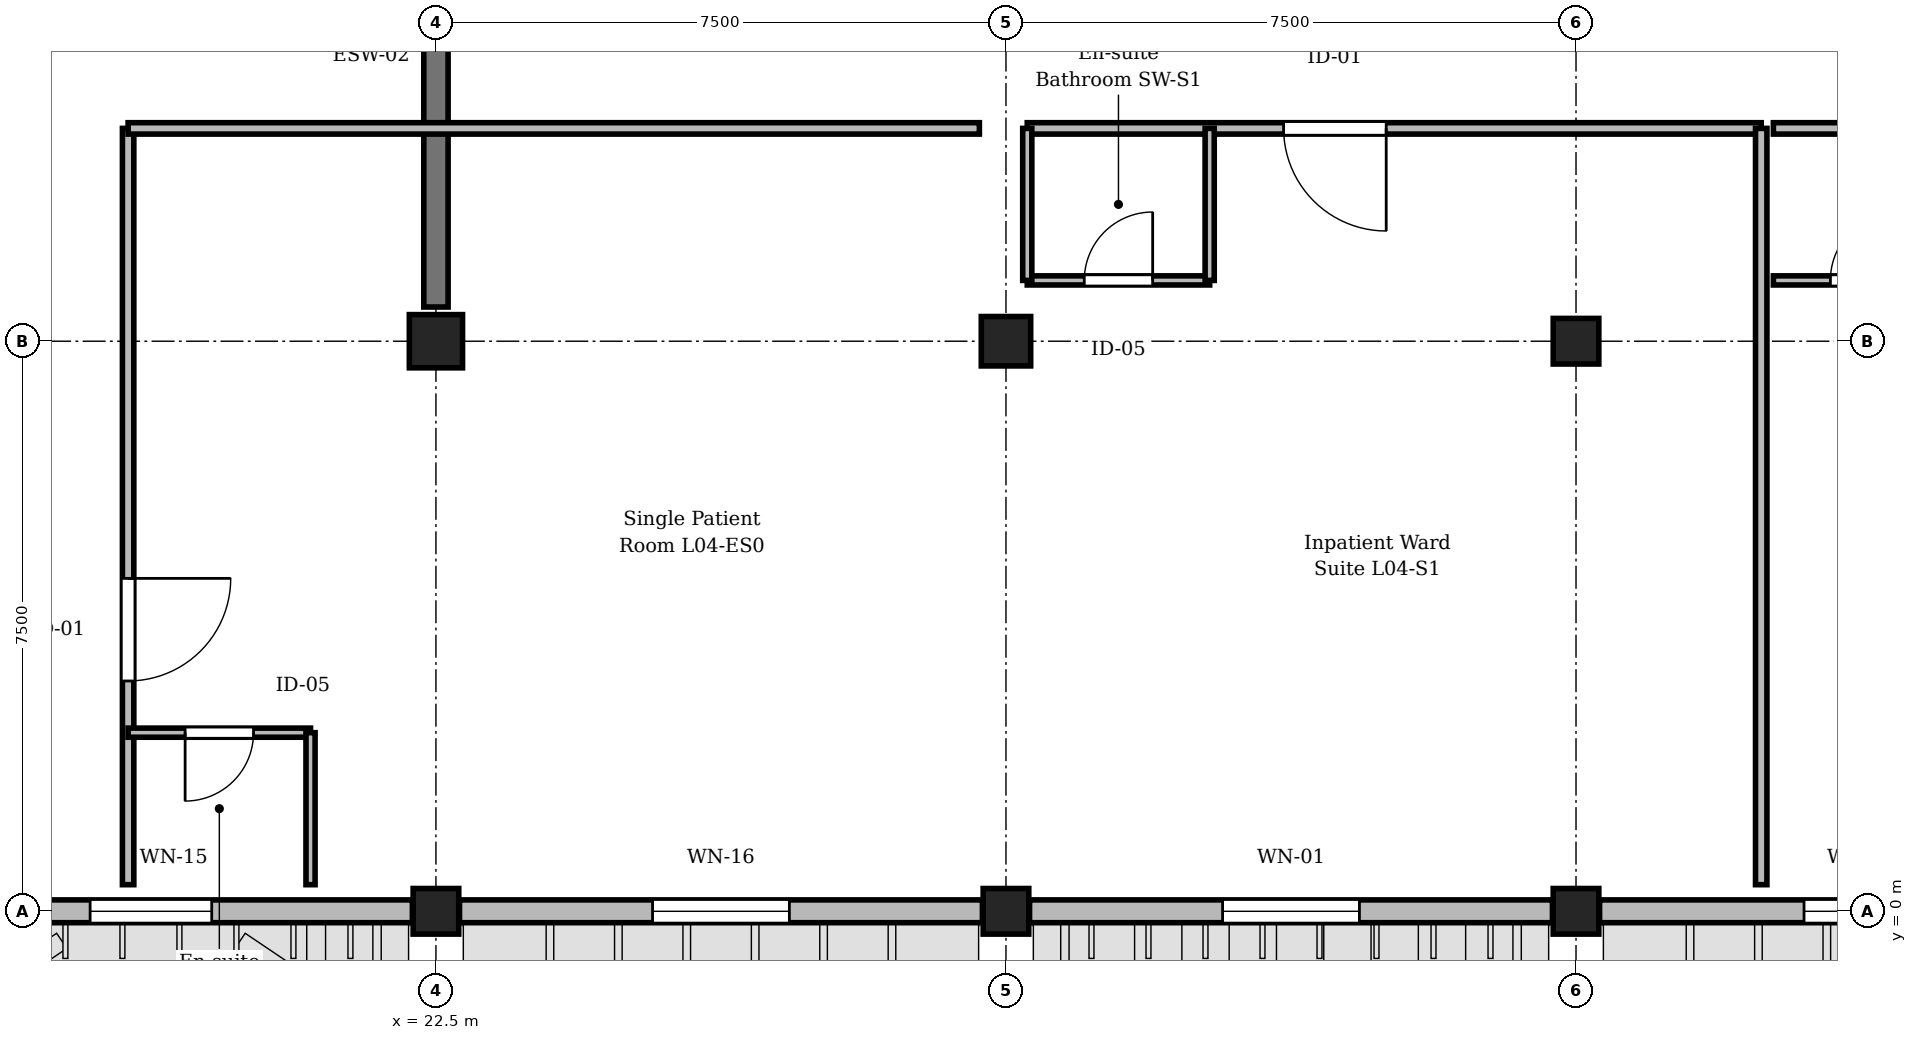
"""IFC4 building model, lengths in metres.
Left out: names, types, materials, properties, quantities, classifications, styles, units other than length and angle.
Written with IfcOpenShell. Run it as: python <this file> out.ifc"""

import sys

from ifc_helpers import new_model, si_unit, direction, frame, frame_2d, origin, origin_2d, place, context, subcontext, project, spatial, rectangle, circle, extrude, element, fill, save


model = new_model("IFC4")
c1 = context("Model", 3, precision=1e-05, world=origin(), true_north=direction((0.0, 1.0)))
c2 = subcontext(c1, "Body", "Model", "MODEL_VIEW")
j1 = project(units=[si_unit("LENGTHUNIT", "METRE"), si_unit("PLANEANGLEUNIT", "RADIAN")], contexts=[c1])
p1 = place(None, origin())
s1 = spatial("IfcSite", under=j1, at=p1, CompositionType="ELEMENT")
p2 = place(p1, origin())
s2 = spatial("IfcBuilding", under=s1, at=p2, CompositionType="ELEMENT")
p3 = place(p2, frame((0.0, 0.0, 17.85)))
s3 = spatial("IfcBuildingStorey", under=s2, at=p3, CompositionType="ELEMENT", Elevation=17.85)
p4 = place(p3, frame((22.5, 0.0, 0.0), z_axis=(0.0, 0.0, 1.0), x_axis=(1.0, 0.0, 0.0)))
e1 = element("IfcColumn", 1, at=p4, inside=s3, PredefinedType="COLUMN", context=c2, shape_type="SweptSolid", body=[
    extrude(circle(Radius=0.3, at=origin_2d()), origin(), (0.0, 0.0, 1.0), 4.05),
])
p5 = place(p3, frame((22.5, 7.5, 0.0), z_axis=(0.0, 0.0, 1.0), x_axis=(1.0, 0.0, 0.0)))
e2 = element("IfcColumn", 2, at=p5, inside=s3, PredefinedType="COLUMN", context=c2, shape_type="SweptSolid", body=[
    extrude(rectangle(XDim=0.7, YDim=0.7, at=origin_2d()), origin(), (0.0, 0.0, 1.0), 4.05),
])
p6 = place(p3, frame((30.0, 0.0, 0.0), z_axis=(0.0, 0.0, 1.0), x_axis=(1.0, 0.0, 0.0)))
e3 = element("IfcColumn", 3, at=p6, inside=s3, PredefinedType="COLUMN", context=c2, shape_type="SweptSolid", body=[
    extrude(rectangle(XDim=0.6, YDim=0.6, at=origin_2d()), origin(), (0.0, 0.0, 1.0), 4.05),
])
p7 = place(p3, frame((30.0, 7.5, 0.0), z_axis=(0.0, 0.0, 1.0), x_axis=(1.0, 0.0, 0.0)))
e4 = element("IfcColumn", 4, at=p7, inside=s3, PredefinedType="COLUMN", context=c2, shape_type="SweptSolid", body=[
    extrude(rectangle(XDim=0.65, YDim=0.65, at=origin_2d()), origin(), (0.0, 0.0, 1.0), 4.05),
])
p8 = place(p3, frame((37.5, 0.0, 0.0), z_axis=(0.0, 0.0, 1.0), x_axis=(1.0, 0.0, 0.0)))
e5 = element("IfcColumn", 5, at=p8, inside=s3, PredefinedType="COLUMN", context=c2, shape_type="SweptSolid", body=[
    extrude(rectangle(XDim=0.6, YDim=0.6, at=origin_2d()), origin(), (0.0, 0.0, 1.0), 4.05),
])
p9 = place(p3, frame((37.5, 7.5, 0.0), z_axis=(0.0, 0.0, 1.0), x_axis=(1.0, 0.0, 0.0)))
e6 = element("IfcColumn", 6, at=p9, inside=s3, PredefinedType="COLUMN", context=c2, shape_type="SweptSolid", body=[
    extrude(circle(Radius=0.3, at=origin_2d()), origin(), (0.0, 0.0, 1.0), 4.05),
])
p10 = place(p3, frame((22.5, 7.95, 0.0), z_axis=(0.0, 0.0, 1.0), x_axis=(0.0, 1.0, 0.0)))
e7 = element("IfcWall", 7, at=p10, inside=s3, PredefinedType="SHEAR", context=c2, shape_type="SweptSolid", body=[
    extrude(rectangle(XDim=6.6, YDim=0.32, at=frame_2d((3.3, 0.0))), origin(), (0.0, 0.0, 1.0), 3.22),
])
p11 = place(p3, frame((22.19, 0.0, 0.0), z_axis=(0.0, 0.0, 1.0), x_axis=(-1.0, 0.0, 0.0)))
e8 = element("IfcWall", 8, at=p11, inside=s3, PredefinedType="STANDARD", context=c2, shape_type="SweptSolid", body=[
    extrude(rectangle(XDim=6.88, YDim=0.3, at=frame_2d((3.44, 0.0))), origin(), (0.0, 0.0, 1.0), 3.17),
])
p12 = place(p11, frame((2.64, 0.0, 0.9)))
e9 = element("IfcOpeningElement", 9, at=p12, cuts=e8, PredefinedType="OPENING", context=c2, shape_type="SweptSolid", body=[
    extrude(rectangle(XDim=1.6, YDim=1.8, at=frame_2d((0.8, 0.9))), frame((0.0, 0.16, 0.0), z_axis=(0.0, -1.0, 0.0), x_axis=(1.0, 0.0, 0.0)), (0.0, 0.0, 1.0), 0.32),
])
p13 = place(p3, frame((29.69, 0.0, 0.0), z_axis=(0.0, 0.0, 1.0), x_axis=(-1.0, 0.0, 0.0)))
e10 = element("IfcWall", 10, at=p13, inside=s3, PredefinedType="STANDARD", context=c2, shape_type="SweptSolid", body=[
    extrude(rectangle(XDim=6.88, YDim=0.3, at=frame_2d((3.44, 0.0))), origin(), (0.0, 0.0, 1.0), 3.17),
])
p14 = place(p13, frame((2.54, 0.0, 0.9)))
e11 = element("IfcOpeningElement", 11, at=p14, cuts=e10, PredefinedType="OPENING", context=c2, shape_type="SweptSolid", body=[
    extrude(rectangle(XDim=1.8, YDim=1.8, at=frame_2d((0.9, 0.9))), frame((0.0, 0.16, 0.0), z_axis=(0.0, -1.0, 0.0), x_axis=(1.0, 0.0, 0.0)), (0.0, 0.0, 1.0), 0.32),
])
p15 = place(p3, frame((37.19, 0.0, 0.0), z_axis=(0.0, 0.0, 1.0), x_axis=(-1.0, 0.0, 0.0)))
e12 = element("IfcWall", 12, at=p15, inside=s3, PredefinedType="STANDARD", context=c2, shape_type="SweptSolid", body=[
    extrude(rectangle(XDim=6.88, YDim=0.3, at=frame_2d((3.44, 0.0))), origin(), (0.0, 0.0, 1.0), 3.17),
])
p16 = place(p15, frame((2.54, 0.0, 0.9)))
e13 = element("IfcOpeningElement", 13, at=p16, cuts=e12, PredefinedType="OPENING", context=c2, shape_type="SweptSolid", body=[
    extrude(rectangle(XDim=1.8, YDim=1.99, at=frame_2d((0.9, 0.995))), frame((0.0, 0.16, 0.0), z_axis=(0.0, -1.0, 0.0), x_axis=(1.0, 0.0, 0.0)), (0.0, 0.0, 1.0), 0.32),
])
p17 = place(p3, frame((44.69, 0.0, 0.0), z_axis=(0.0, 0.0, 1.0), x_axis=(-1.0, 0.0, 0.0)))
e14 = element("IfcWall", 14, at=p17, inside=s3, PredefinedType="STANDARD", context=c2, shape_type="SweptSolid", body=[
    extrude(rectangle(XDim=6.88, YDim=0.3, at=frame_2d((3.44, 0.0))), origin(), (0.0, 0.0, 1.0), 3.17),
])
p18 = place(p17, frame((2.69, 0.0, 0.9)))
e15 = element("IfcOpeningElement", 15, at=p18, cuts=e14, PredefinedType="OPENING", context=c2, shape_type="SweptSolid", body=[
    extrude(rectangle(XDim=1.5, YDim=1.99, at=frame_2d((0.75, 0.995))), frame((0.0, 0.16, 0.0), z_axis=(0.0, -1.0, 0.0), x_axis=(1.0, 0.0, 0.0)), (0.0, 0.0, 1.0), 0.32),
])
p19 = place(p3, frame((18.45, 10.3, 0.0), z_axis=(0.0, 0.0, 1.0), x_axis=(0.0, -1.0, 0.0)))
e16 = element("IfcWall", 16, at=p19, inside=s3, PredefinedType="PARTITIONING", context=c2, shape_type="SweptSolid", body=[
    extrude(rectangle(XDim=9.95, YDim=0.15, at=frame_2d((4.975, 0.0))), origin(), (0.0, 0.0, 1.0), 3.755),
])
p20 = place(p19, frame((5.92, 0.0, 0.0)))
e17 = element("IfcOpeningElement", 17, at=p20, cuts=e16, PredefinedType="OPENING", context=c2, shape_type="SweptSolid", body=[
    extrude(rectangle(XDim=1.35, YDim=2.25, at=frame_2d((0.675, 1.125))), frame((0.0, 0.085, 0.0), z_axis=(0.0, -1.0, 0.0), x_axis=(1.0, 0.0, 0.0)), (0.0, 0.0, 1.0), 0.17),
])
p21 = place(p3, frame((20.85, 2.35, 0.0), z_axis=(0.0, 0.0, 1.0), x_axis=(-1.0, 0.0, 0.0)))
e18 = element("IfcWall", 18, at=p21, inside=s3, PredefinedType="PARTITIONING", context=c2, shape_type="SweptSolid", body=[
    extrude(rectangle(XDim=2.4, YDim=0.12, at=frame_2d((1.2, 0.0))), origin(), (0.0, 0.0, 1.0), 3.755),
])
p22 = place(p21, frame((0.75, 0.0, 0.0)))
e19 = element("IfcOpeningElement", 19, at=p22, cuts=e18, PredefinedType="OPENING", context=c2, shape_type="SweptSolid", body=[
    extrude(rectangle(XDim=0.9, YDim=2.1, at=frame_2d((0.45, 1.05))), frame((0.0, 0.07, 0.0), z_axis=(0.0, -1.0, 0.0), x_axis=(1.0, 0.0, 0.0)), (0.0, 0.0, 1.0), 0.14),
])
p23 = place(p3, frame((20.85, 0.35, 0.0), z_axis=(0.0, 0.0, 1.0), x_axis=(0.0, 1.0, 0.0)))
e20 = element("IfcWall", 20, at=p23, inside=s3, PredefinedType="PARTITIONING", context=c2, shape_type="SweptSolid", body=[
    extrude(rectangle(XDim=2.0, YDim=0.12, at=frame_2d((1.0, 0.0))), origin(), (0.0, 0.0, 1.0), 3.755),
])
p24 = place(p3, frame((39.937, 10.3, 0.0), z_axis=(0.0, 0.0, 1.0), x_axis=(-1.0, 0.0, 0.0)))
e21 = element("IfcWall", 21, at=p24, inside=s3, PredefinedType="PARTITIONING", context=c2, shape_type="SweptSolid", body=[
    extrude(rectangle(XDim=9.657, YDim=0.15, at=frame_2d((4.828, 0.0))), origin(), (0.0, 0.0, 1.0), 3.755),
])
p25 = place(p24, frame((4.934, 0.0, 0.0)))
e22 = element("IfcOpeningElement", 22, at=p25, cuts=e21, PredefinedType="OPENING", context=c2, shape_type="SweptSolid", body=[
    extrude(rectangle(XDim=1.35, YDim=2.25, at=frame_2d((0.675, 1.125))), frame((0.0, 0.085, 0.0), z_axis=(0.0, -1.0, 0.0), x_axis=(1.0, 0.0, 0.0)), (0.0, 0.0, 1.0), 0.17),
])
p26 = place(p3, frame((30.28, 8.3, 0.0), z_axis=(0.0, 0.0, 1.0), x_axis=(1.0, 0.0, 0.0)))
e23 = element("IfcWall", 23, at=p26, inside=s3, PredefinedType="PARTITIONING", context=c2, shape_type="SweptSolid", body=[
    extrude(rectangle(XDim=2.4, YDim=0.12, at=frame_2d((1.2, 0.0))), origin(), (0.0, 0.0, 1.0), 3.755),
])
p27 = place(p26, frame((0.75, 0.0, 0.0)))
e24 = element("IfcOpeningElement", 24, at=p27, cuts=e23, PredefinedType="OPENING", context=c2, shape_type="SweptSolid", body=[
    extrude(rectangle(XDim=0.9, YDim=2.1, at=frame_2d((0.45, 1.05))), frame((0.0, 0.07, 0.0), z_axis=(0.0, -1.0, 0.0), x_axis=(1.0, 0.0, 0.0)), (0.0, 0.0, 1.0), 0.14),
])
p28 = place(p3, frame((32.68, 8.3, 0.0), z_axis=(0.0, 0.0, 1.0), x_axis=(0.0, 1.0, 0.0)))
e25 = element("IfcWall", 25, at=p28, inside=s3, PredefinedType="PARTITIONING", context=c2, shape_type="SweptSolid", body=[
    extrude(rectangle(XDim=2.0, YDim=0.12, at=frame_2d((1.0, 0.0))), origin(), (0.0, 0.0, 1.0), 3.755),
])
p29 = place(p3, frame((49.753, 10.3, 0.0), z_axis=(0.0, 0.0, 1.0), x_axis=(-1.0, 0.0, 0.0)))
e26 = element("IfcWall", 26, at=p29, inside=s3, PredefinedType="PARTITIONING", context=c2, shape_type="SweptSolid", body=[
    extrude(rectangle(XDim=9.657, YDim=0.15, at=frame_2d((4.828, 0.0))), origin(), (0.0, 0.0, 1.0), 3.755),
])
p30 = place(p29, frame((0.25, 0.0, 0.0)))
e27 = element("IfcOpeningElement", 27, at=p30, cuts=e26, PredefinedType="OPENING", context=c2, shape_type="SweptSolid", body=[
    extrude(rectangle(XDim=1.35, YDim=2.25, at=frame_2d((0.675, 1.125))), frame((0.0, 0.085, 0.0), z_axis=(0.0, -1.0, 0.0), x_axis=(1.0, 0.0, 0.0)), (0.0, 0.0, 1.0), 0.17),
])
p31 = place(p3, frame((40.097, 8.3, 0.0), z_axis=(0.0, 0.0, 1.0), x_axis=(1.0, 0.0, 0.0)))
e28 = element("IfcWall", 28, at=p31, inside=s3, PredefinedType="PARTITIONING", context=c2, shape_type="SweptSolid", body=[
    extrude(rectangle(XDim=2.4, YDim=0.12, at=frame_2d((1.2, 0.0))), origin(), (0.0, 0.0, 1.0), 3.755),
])
p32 = place(p31, frame((0.75, 0.0, 0.0)))
e29 = element("IfcOpeningElement", 29, at=p32, cuts=e28, PredefinedType="OPENING", context=c2, shape_type="SweptSolid", body=[
    extrude(rectangle(XDim=0.9, YDim=2.1, at=frame_2d((0.45, 1.05))), frame((0.0, 0.07, 0.0), z_axis=(0.0, -1.0, 0.0), x_axis=(1.0, 0.0, 0.0)), (0.0, 0.0, 1.0), 0.14),
])
p33 = place(p3, frame((18.45, 10.3, 0.0), z_axis=(0.0, 0.0, 1.0), x_axis=(1.0, 0.0, 0.0)))
e30 = element("IfcWall", 30, at=p33, inside=s3, PredefinedType="PARTITIONING", context=c2, shape_type="SweptSolid", body=[
    extrude(rectangle(XDim=11.2, YDim=0.15, at=frame_2d((5.6, 0.0))), origin(), (0.0, 0.0, 1.0), 3.755),
])
p34 = place(p3, frame((39.937, 0.35, 0.0), z_axis=(0.0, 0.0, 1.0), x_axis=(0.0, 1.0, 0.0)))
e31 = element("IfcWall", 31, at=p34, inside=s3, PredefinedType="PARTITIONING", context=c2, shape_type="SweptSolid", body=[
    extrude(rectangle(XDim=9.95, YDim=0.15, at=frame_2d((4.975, 0.0))), origin(), (0.0, 0.0, 1.0), 3.755),
])
p35 = place(p3, frame((30.28, 8.3, 0.0), z_axis=(0.0, 0.0, 1.0), x_axis=(0.0, 1.0, 0.0)))
e32 = element("IfcWall", 32, at=p35, inside=s3, PredefinedType="PARTITIONING", context=c2, shape_type="SweptSolid", body=[
    extrude(rectangle(XDim=2.0, YDim=0.12, at=frame_2d((1.0, 0.0))), origin(), (0.0, 0.0, 1.0), 3.255),
])
p36 = place(p12, origin())
e33 = element("IfcWindow", 33, at=p36, inside=s3, PartitioningType="SINGLE_PANEL", PredefinedType="WINDOW", context=c2, shape_type="SweptSolid", body=[
    extrude(rectangle(XDim=1.6, YDim=1.8, at=frame_2d((0.8, 0.9))), frame((0.0, 0.03, 0.0), z_axis=(0.0, -1.0, 0.0), x_axis=(1.0, 0.0, 0.0)), (0.0, 0.0, 1.0), 0.06),
])
fill(e9, e33)
p37 = place(p14, origin())
e34 = element("IfcWindow", 34, at=p37, inside=s3, PartitioningType="SINGLE_PANEL", PredefinedType="WINDOW", context=c2, shape_type="SweptSolid", body=[
    extrude(rectangle(XDim=1.8, YDim=1.8, at=frame_2d((0.9, 0.9))), frame((0.0, 0.03, 0.0), z_axis=(0.0, -1.0, 0.0), x_axis=(1.0, 0.0, 0.0)), (0.0, 0.0, 1.0), 0.06),
])
fill(e11, e34)
p38 = place(p16, origin())
e35 = element("IfcWindow", 35, at=p38, inside=s3, PartitioningType="SINGLE_PANEL", PredefinedType="WINDOW", context=c2, shape_type="SweptSolid", body=[
    extrude(rectangle(XDim=1.8, YDim=1.99, at=frame_2d((0.9, 0.995))), frame((0.0, 0.03, 0.0), z_axis=(0.0, -1.0, 0.0), x_axis=(1.0, 0.0, 0.0)), (0.0, 0.0, 1.0), 0.06),
])
fill(e13, e35)
p39 = place(p18, origin())
e36 = element("IfcWindow", 36, at=p39, inside=s3, PartitioningType="SINGLE_PANEL", PredefinedType="WINDOW", context=c2, shape_type="SweptSolid", body=[
    extrude(rectangle(XDim=1.5, YDim=1.99, at=frame_2d((0.75, 0.995))), frame((0.0, 0.03, 0.0), z_axis=(0.0, -1.0, 0.0), x_axis=(1.0, 0.0, 0.0)), (0.0, 0.0, 1.0), 0.06),
])
fill(e15, e36)
p40 = place(p20, origin())
e37 = element("IfcDoor", 37, at=p40, inside=s3, OperationType="SINGLE_SWING_LEFT", PredefinedType="DOOR", context=c2, shape_type="SweptSolid", body=[
    extrude(rectangle(XDim=1.35, YDim=2.25, at=frame_2d((0.675, 1.125))), frame((0.0, 0.025, 0.0), z_axis=(0.0, -1.0, 0.0), x_axis=(1.0, 0.0, 0.0)), (0.0, 0.0, 1.0), 0.05),
])
fill(e17, e37)
p41 = place(p22, origin())
e38 = element("IfcDoor", 38, at=p41, inside=s3, OperationType="SINGLE_SWING_RIGHT", PredefinedType="DOOR", context=c2, shape_type="SweptSolid", body=[
    extrude(rectangle(XDim=0.9, YDim=2.1, at=frame_2d((0.45, 1.05))), frame((0.0, 0.025, 0.0), z_axis=(0.0, -1.0, 0.0), x_axis=(1.0, 0.0, 0.0)), (0.0, 0.0, 1.0), 0.05),
])
fill(e19, e38)
p42 = place(p25, origin())
e39 = element("IfcDoor", 39, at=p42, inside=s3, OperationType="SINGLE_SWING_LEFT", PredefinedType="DOOR", context=c2, shape_type="SweptSolid", body=[
    extrude(rectangle(XDim=1.35, YDim=2.25, at=frame_2d((0.675, 1.125))), frame((0.0, 0.025, 0.0), z_axis=(0.0, -1.0, 0.0), x_axis=(1.0, 0.0, 0.0)), (0.0, 0.0, 1.0), 0.05),
])
fill(e22, e39)
p43 = place(p27, origin())
e40 = element("IfcDoor", 40, at=p43, inside=s3, OperationType="SINGLE_SWING_RIGHT", PredefinedType="DOOR", context=c2, shape_type="SweptSolid", body=[
    extrude(rectangle(XDim=0.9, YDim=2.1, at=frame_2d((0.45, 1.05))), frame((0.0, 0.025, 0.0), z_axis=(0.0, -1.0, 0.0), x_axis=(1.0, 0.0, 0.0)), (0.0, 0.0, 1.0), 0.05),
])
fill(e24, e40)
p44 = place(p32, origin())
e41 = element("IfcDoor", 41, at=p44, inside=s3, OperationType="SINGLE_SWING_RIGHT", PredefinedType="DOOR", context=c2, shape_type="SweptSolid", body=[
    extrude(rectangle(XDim=0.9, YDim=2.1, at=frame_2d((0.45, 1.05))), frame((0.0, 0.025, 0.0), z_axis=(0.0, -1.0, 0.0), x_axis=(1.0, 0.0, 0.0)), (0.0, 0.0, 1.0), 0.05),
])
fill(e29, e41)
save(model, sys.argv[1])
